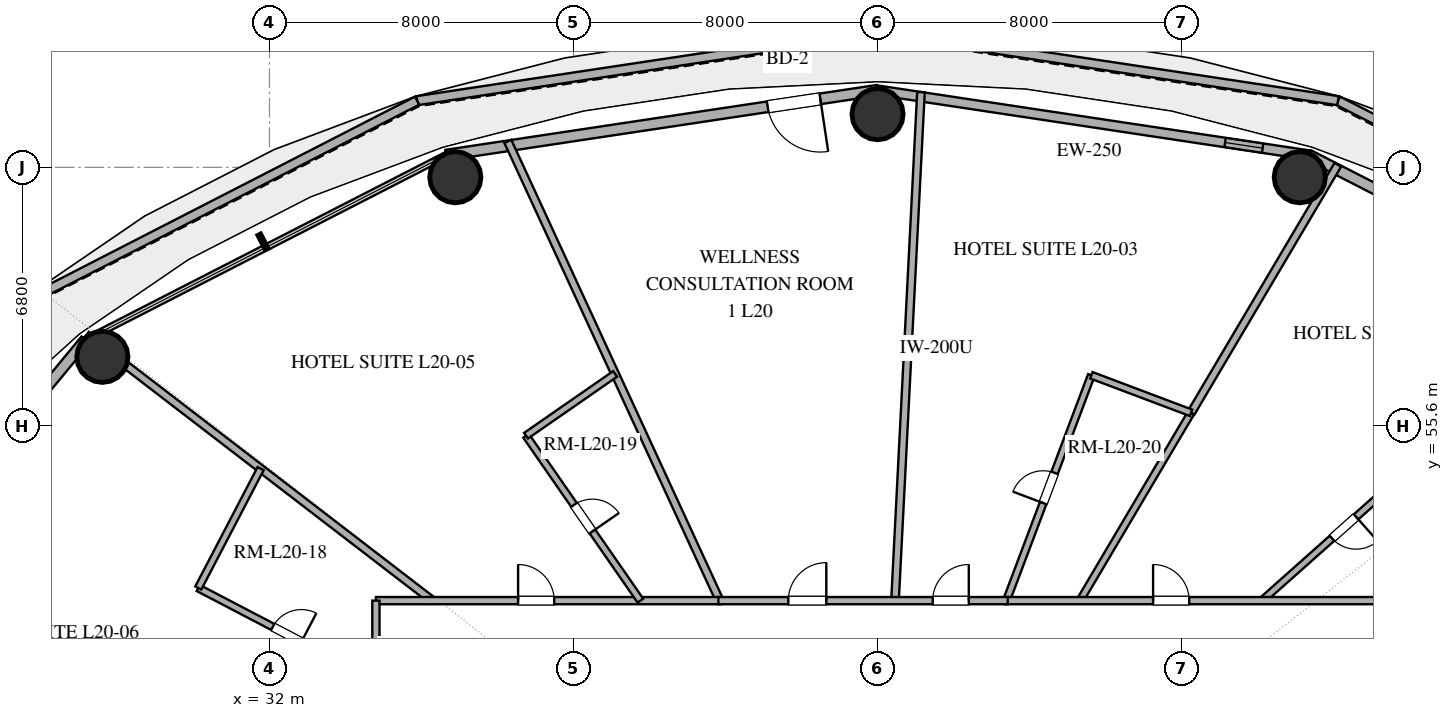
"""IFC4 building model, lengths in metres.
Left out: names, types, materials, properties, quantities, classifications, styles, units other than length and angle.
Written with IfcOpenShell. Run it as: python <this file> out.ifc"""

import sys

from ifc_helpers import new_model, si_unit, direction, frame, frame_2d, origin, origin_2d, place, context, subcontext, project, spatial, rectangle, hollow_circle, extrude, element, fill, save


model = new_model("IFC4")
c1 = context("Model", 3, precision=1e-05, world=origin(), true_north=direction((0.0, 1.0)))
c2 = subcontext(c1, "Body", "Model", "MODEL_VIEW")
j1 = project(units=[si_unit("LENGTHUNIT", "METRE"), si_unit("PLANEANGLEUNIT", "RADIAN")], contexts=[c1])
p1 = place(None, origin())
s1 = spatial("IfcSite", under=j1, at=p1, CompositionType="ELEMENT")
p2 = place(p1, origin())
s2 = spatial("IfcBuilding", under=s1, at=p2, CompositionType="ELEMENT")
p3 = place(p2, frame((0.0, 0.0, 84.0)))
s3 = spatial("IfcBuildingStorey", under=s2, at=p3, CompositionType="ELEMENT", Elevation=84.0)
for number, where, z_axis, x_axis in (
    (1, (59.11, 62.141, 0.0), (0.0, 0.0, 1.0), (1.0, 0.0, 0.0)),
    (2, (48.0, 63.8, 0.0), (0.0, 0.0, 1.0), (1.0, 0.0, 0.0)),
    (3, (36.89, 62.141, 0.0), (0.0, 0.0, 1.0), (1.0, 0.0, 0.0)),
    (4, (27.602, 57.415, 0.0), (0.0, 0.0, 1.0), (1.0, 0.0, 0.0)),
):
    element("IfcColumn", number, at=place(p3, frame(where, z_axis=z_axis, x_axis=x_axis)), inside=s3, PredefinedType="COLUMN", context=c2, shape_type="SweptSolid", body=[
        extrude(hollow_circle(Radius=0.675, WallThickness=0.036, at=origin_2d()), origin(), (0.0, 0.0, 1.0), 3.38),
    ])
p4 = place(p3, frame((70.244, 58.956, 0.0), z_axis=(0.0, 0.0, 1.0), x_axis=(-0.889663800129, 0.456616165658, 0.0)))
e5 = element("IfcWall", 5, at=p4, inside=s3, PredefinedType="PARAPET", context=c2, shape_type="SweptSolid", body=[
    extrude(rectangle(XDim=11.384, YDim=0.24, at=frame_2d((5.692, 0.0))), origin(), (0.0, 0.0, 1.0), 1.25),
])
for number, where, z_axis, x_axis in (
    (6, (60.116, 64.155, 0.0), (0.0, 0.0, 1.0), (-0.989, 0.149, 0.0)),
    (7, (48.0, 65.98, 0.0), (0.0, 0.0, 1.0), (-0.989, -0.149, 0.0)),
):
    element("IfcWall", number, at=place(p3, frame(where, z_axis=z_axis, x_axis=x_axis)), inside=s3, PredefinedType="PARAPET", context=c2, shape_type="SweptSolid", body=[
        extrude(rectangle(XDim=12.253, YDim=0.24, at=frame_2d((6.126, 0.0))), origin(), (0.0, 0.0, 1.0), 1.25),
    ])
p5 = place(p3, frame((35.884, 64.155, 0.0), z_axis=(0.0, 0.0, 1.0), x_axis=(-0.889663800129, -0.456616165658, 0.0)))
e8 = element("IfcWall", 8, at=p5, inside=s3, PredefinedType="PARAPET", context=c2, shape_type="SweptSolid", body=[
    extrude(rectangle(XDim=11.384, YDim=0.24, at=frame_2d((5.692, 0.0))), origin(), (0.0, 0.0, 1.0), 1.25),
])
p6 = place(p3, frame((68.84, 57.86, 0.0), z_axis=(0.0, 0.0, 1.0), x_axis=(-0.889959505023, 0.45603955905, 0.0)))
e9 = element("IfcWall", 9, at=p6, inside=s3, PredefinedType="SOLIDWALL", context=c2, shape_type="SweptSolid", body=[
    extrude(rectangle(XDim=10.662, YDim=0.28, at=frame_2d((5.331, 0.0))), origin(), (0.0, 0.0, 1.0), 3.38),
])
p7 = place(p6, frame((3.331, 0.0, 0.85)))
e10 = element("IfcOpeningElement", 10, at=p7, cuts=e9, PredefinedType="OPENING", context=c2, shape_type="SweptSolid", body=[
    extrude(rectangle(XDim=1.2, YDim=1.6, at=frame_2d((0.6, 0.8))), frame((0.0, 0.15, 0.0), z_axis=(0.0, -1.0, 0.0), x_axis=(1.0, 0.0, 0.0)), (0.0, 0.0, 1.0), 0.3),
])
p8 = place(p6, frame((6.271, 0.0, 0.85)))
e11 = element("IfcOpeningElement", 11, at=p8, cuts=e9, PredefinedType="OPENING", context=c2, shape_type="SweptSolid", body=[
    extrude(rectangle(XDim=1.2, YDim=1.6, at=frame_2d((0.6, 0.8))), frame((0.0, 0.15, 0.0), z_axis=(0.0, -1.0, 0.0), x_axis=(1.0, 0.0, 0.0)), (0.0, 0.0, 1.0), 0.3),
])
p9 = place(p3, frame((59.351, 62.723, 0.0), z_axis=(0.0, 0.0, 1.0), x_axis=(-0.988877774656, 0.148730450117, 0.0)))
e12 = element("IfcWall", 12, at=p9, inside=s3, PredefinedType="SOLIDWALL", context=c2, shape_type="SweptSolid", body=[
    extrude(rectangle(XDim=11.479, YDim=0.25, at=frame_2d((5.74, 0.0))), origin(), (0.0, 0.0, 1.0), 3.38),
])
p10 = place(p9, frame((1.231, 0.0, 1.42)))
e13 = element("IfcOpeningElement", 13, at=p10, cuts=e12, PredefinedType="OPENING", context=c2, shape_type="SweptSolid", body=[
    extrude(rectangle(XDim=1.0, YDim=1.05, at=frame_2d((0.5, 0.525))), frame((0.0, 0.135, 0.0), z_axis=(0.0, -1.0, 0.0), x_axis=(1.0, 0.0, 0.0)), (0.0, 0.0, 1.0), 0.27),
])
p11 = place(p3, frame((48.0, 64.43, 0.0), z_axis=(0.0, 0.0, 1.0), x_axis=(-0.988877774656, -0.148730450117, 0.0)))
e14 = element("IfcWall", 14, at=p11, inside=s3, PredefinedType="SOLIDWALL", context=c2, shape_type="SweptSolid", body=[
    extrude(rectangle(XDim=11.479, YDim=0.28, at=frame_2d((5.74, 0.0))), origin(), (0.0, 0.0, 1.0), 3.38),
])
p12 = place(p11, frame((1.524, 0.0, 0.0)))
e15 = element("IfcOpeningElement", 15, at=p12, cuts=e14, PredefinedType="OPENING", context=c2, shape_type="SweptSolid", body=[
    extrude(rectangle(XDim=1.4, YDim=2.2, at=frame_2d((0.7, 1.1))), frame((0.0, 0.15, 0.0), z_axis=(0.0, -1.0, 0.0), x_axis=(1.0, 0.0, 0.0)), (0.0, 0.0, 1.0), 0.3),
])
p13 = place(p3, frame((27.16, 57.86, 0.0), z_axis=(0.0, 0.0, 1.0), x_axis=(-0.637505817448, -0.770445541696, 0.0)))
e16 = element("IfcWall", 16, at=p13, inside=s3, PredefinedType="SOLIDWALL", context=c2, shape_type="SweptSolid", body=[
    extrude(rectangle(XDim=9.445, YDim=0.28, at=frame_2d((4.723, 0.0))), origin(), (0.0, 0.0, 1.0), 3.38),
])
p14 = place(p13, frame((2.597, 0.0, 0.85)))
e17 = element("IfcOpeningElement", 17, at=p14, cuts=e16, PredefinedType="OPENING", context=c2, shape_type="SweptSolid", body=[
    extrude(rectangle(XDim=1.5, YDim=2.0, at=frame_2d((0.75, 1.0))), frame((0.0, 0.15, 0.0), z_axis=(0.0, -1.0, 0.0), x_axis=(1.0, 0.0, 0.0)), (0.0, 0.0, 1.0), 0.3),
])
p15 = place(p13, frame((5.232, 0.0, 0.85)))
e18 = element("IfcOpeningElement", 18, at=p15, cuts=e16, PredefinedType="OPENING", context=c2, shape_type="SweptSolid", body=[
    extrude(rectangle(XDim=1.5, YDim=2.0, at=frame_2d((0.75, 1.0))), frame((0.0, 0.15, 0.0), z_axis=(0.0, -1.0, 0.0), x_axis=(1.0, 0.0, 0.0)), (0.0, 0.0, 1.0), 0.3),
])
p16 = place(p3, frame((49.143, 64.379, 0.0), z_axis=(0.0, 0.0, 1.0), x_axis=(-0.050973793346, -0.998699991185, 0.0)))
e19 = element("IfcWall", 19, at=p16, inside=s3, PredefinedType="PARTITIONING", context=c2, shape_type="SweptSolid", body=[
    extrude(rectangle(XDim=13.396, YDim=0.2, at=frame_2d((6.698, 0.0))), origin(), (0.0, 0.0, 1.0), 2.74),
])
p17 = place(p3, frame((60.112, 62.468, 0.0), z_axis=(0.0, 0.0, 1.0), x_axis=(-0.509263960295, -0.860610375689, 0.0)))
e20 = element("IfcWall", 20, at=p17, inside=s3, PredefinedType="PARTITIONING", context=c2, shape_type="SweptSolid", body=[
    extrude(rectangle(XDim=7.583, YDim=0.2, at=frame_2d((3.792, 0.0))), origin(), (0.0, 0.0, 1.0), 2.74),
])
p18 = place(p3, frame((43.847, 51.0, 0.0), z_axis=(0.0, 0.0, 1.0), x_axis=(-0.418953467184, 0.908007704997, 0.0)))
e21 = element("IfcWall", 21, at=p18, inside=s3, PredefinedType="PARTITIONING", context=c2, shape_type="SweptSolid", body=[
    extrude(rectangle(XDim=13.307, YDim=0.2, at=frame_2d((6.654, 0.0))), origin(), (0.0, 0.0, 1.0), 2.74),
])
p19 = place(p3, frame((51.391, 51.0, 0.0), z_axis=(0.0, 0.0, 1.0), x_axis=(0.352583810303, 0.935780239539, 0.0)))
e22 = element("IfcWall", 22, at=p19, inside=s3, PredefinedType="PLUMBINGWALL", context=c2, shape_type="SweptSolid", body=[
    extrude(rectangle(XDim=6.337, YDim=0.18, at=frame_2d((3.168, 0.0))), origin(), (0.0, 0.0, 1.0), 2.74),
])
p20 = place(p19, frame((2.744, 0.0, 0.0)))
e23 = element("IfcOpeningElement", 23, at=p20, cuts=e22, PredefinedType="OPENING", context=c2, shape_type="SweptSolid", body=[
    extrude(rectangle(XDim=0.85, YDim=2.1, at=frame_2d((0.425, 1.05))), frame((0.0, 0.1, 0.0), z_axis=(0.0, -1.0, 0.0), x_axis=(1.0, 0.0, 0.0)), (0.0, 0.0, 1.0), 0.2),
])
p21 = place(p3, frame((36.287, 51.0, 0.0), z_axis=(0.0, 0.0, 1.0), x_axis=(-0.792955910196, 0.609279020224, 0.0)))
e24 = element("IfcWall", 24, at=p21, inside=s3, PredefinedType="PARTITIONING", context=c2, shape_type="SweptSolid", body=[
    extrude(rectangle(XDim=11.48, YDim=0.2, at=frame_2d((5.74, 0.0))), origin(), (0.0, 0.0, 1.0), 2.74),
])
p22 = place(p3, frame((62.436, 54.844, 0.0), z_axis=(0.0, 0.0, 1.0), x_axis=(-0.747085499985, -0.664727956168, 0.0)))
e25 = element("IfcWall", 25, at=p22, inside=s3, PredefinedType="PLUMBINGWALL", context=c2, shape_type="SweptSolid", body=[
    extrude(rectangle(XDim=5.783, YDim=0.18, at=frame_2d((2.892, 0.0))), origin(), (0.0, 0.0, 1.0), 2.74),
])
p23 = place(p22, frame((2.467, 0.0, 0.0)))
e26 = element("IfcOpeningElement", 26, at=p23, cuts=e25, PredefinedType="OPENING", context=c2, shape_type="SweptSolid", body=[
    extrude(rectangle(XDim=0.85, YDim=2.1, at=frame_2d((0.425, 1.05))), frame((0.0, 0.1, 0.0), z_axis=(0.0, -1.0, 0.0), x_axis=(1.0, 0.0, 0.0)), (0.0, 0.0, 1.0), 0.2),
])
p24 = place(p3, frame((56.25, 55.941, 0.0), z_axis=(0.0, 0.0, 1.0), x_axis=(-0.509296473297, -0.860591135376, 0.0)))
e27 = element("IfcWall", 27, at=p24, inside=s3, PredefinedType="PLUMBINGWALL", context=c2, shape_type="SweptSolid", body=[
    extrude(rectangle(XDim=5.742, YDim=0.18, at=frame_2d((2.871, 0.0))), origin(), (0.0, 0.0, 1.0), 2.74),
])
p25 = place(p3, frame((34.8, 51.0, 0.0), z_axis=(0.0, 0.0, 1.0), x_axis=(1.0, 0.0, 0.0)))
e28 = element("IfcWall", 28, at=p25, inside=s3, PredefinedType="PARTITIONING", context=c2, shape_type="SweptSolid", body=[
    extrude(rectangle(XDim=9.083, YDim=0.19, at=frame_2d((4.541, 0.0))), origin(), (0.0, 0.0, 1.0), 2.74),
])
p26 = place(p25, frame((3.741, 0.0, 0.0)))
e29 = element("IfcOpeningElement", 29, at=p26, cuts=e28, PredefinedType="OPENING", context=c2, shape_type="SweptSolid", body=[
    extrude(rectangle(XDim=0.95, YDim=2.15, at=frame_2d((0.475, 1.075))), frame((0.0, 0.105, 0.0), z_axis=(0.0, -1.0, 0.0), x_axis=(1.0, 0.0, 0.0)), (0.0, 0.0, 1.0), 0.21),
])
p27 = place(p3, frame((38.75, 55.34, 0.0), z_axis=(0.0, 0.0, 1.0), x_axis=(0.569842064311, -0.821754234393, 0.0)))
e30 = element("IfcWall", 30, at=p27, inside=s3, PredefinedType="PLUMBINGWALL", context=c2, shape_type="SweptSolid", body=[
    extrude(rectangle(XDim=5.281, YDim=0.18, at=frame_2d((2.641, 0.0))), origin(), (0.0, 0.0, 1.0), 2.74),
])
p28 = place(p27, frame((2.215, 0.0, 0.0)))
e31 = element("IfcOpeningElement", 31, at=p28, cuts=e30, PredefinedType="OPENING", context=c2, shape_type="SweptSolid", body=[
    extrude(rectangle(XDim=0.85, YDim=2.1, at=frame_2d((0.425, 1.05))), frame((0.0, 0.1, 0.0), z_axis=(0.0, -1.0, 0.0), x_axis=(1.0, 0.0, 0.0)), (0.0, 0.0, 1.0), 0.2),
])
p29 = place(p3, frame((30.126, 51.332, 0.0), z_axis=(0.0, 0.0, 1.0), x_axis=(0.886465103711, -0.462795440668, 0.0)))
e32 = element("IfcWall", 32, at=p29, inside=s3, PredefinedType="PLUMBINGWALL", context=c2, shape_type="SweptSolid", body=[
    extrude(rectangle(XDim=5.273, YDim=0.18, at=frame_2d((2.636, 0.0))), origin(), (0.0, 0.0, 1.0), 2.74),
])
p30 = place(p29, frame((2.211, 0.0, 0.0)))
e33 = element("IfcOpeningElement", 33, at=p30, cuts=e32, PredefinedType="OPENING", context=c2, shape_type="SweptSolid", body=[
    extrude(rectangle(XDim=0.85, YDim=2.1, at=frame_2d((0.425, 1.05))), frame((0.0, 0.1, 0.0), z_axis=(0.0, -1.0, 0.0), x_axis=(1.0, 0.0, 0.0)), (0.0, 0.0, 1.0), 0.2),
])
p31 = place(p3, frame((51.357, 51.0, 0.0), z_axis=(0.0, 0.0, 1.0), x_axis=(1.0, 0.0, 0.0)))
e34 = element("IfcWall", 34, at=p31, inside=s3, PredefinedType="PARTITIONING", context=c2, shape_type="SweptSolid", body=[
    extrude(rectangle(XDim=9.843, YDim=0.19, at=frame_2d((4.921, 0.0))), origin(), (0.0, 0.0, 1.0), 2.74),
])
p32 = place(p31, frame((3.894, 0.0, 0.0)))
e35 = element("IfcOpeningElement", 35, at=p32, cuts=e34, PredefinedType="OPENING", context=c2, shape_type="SweptSolid", body=[
    extrude(rectangle(XDim=0.95, YDim=2.15, at=frame_2d((0.475, 1.075))), frame((0.0, 0.105, 0.0), z_axis=(0.0, -1.0, 0.0), x_axis=(1.0, 0.0, 0.0)), (0.0, 0.0, 1.0), 0.21),
])
p33 = place(p3, frame((43.812, 51.0, 0.0), z_axis=(0.0, 0.0, 1.0), x_axis=(1.0, 0.0, 0.0)))
e36 = element("IfcWall", 36, at=p33, inside=s3, PredefinedType="PARTITIONING", context=c2, shape_type="SweptSolid", body=[
    extrude(rectangle(XDim=7.613, YDim=0.19, at=frame_2d((3.807, 0.0))), origin(), (0.0, 0.0, 1.0), 2.74),
])
p34 = place(p33, frame((1.84, 0.0, 0.0)))
e37 = element("IfcOpeningElement", 37, at=p34, cuts=e36, PredefinedType="OPENING", context=c2, shape_type="SweptSolid", body=[
    extrude(rectangle(XDim=1.0, YDim=2.2, at=frame_2d((0.5, 1.1))), frame((0.0, 0.105, 0.0), z_axis=(0.0, -1.0, 0.0), x_axis=(1.0, 0.0, 0.0)), (0.0, 0.0, 1.0), 0.21),
])
p35 = place(p33, frame((5.639, 0.0, 0.0)))
e38 = element("IfcOpeningElement", 38, at=p35, cuts=e36, PredefinedType="OPENING", context=c2, shape_type="SweptSolid", body=[
    extrude(rectangle(XDim=0.95, YDim=2.15, at=frame_2d((0.475, 1.075))), frame((0.0, 0.105, 0.0), z_axis=(0.0, -1.0, 0.0), x_axis=(1.0, 0.0, 0.0)), (0.0, 0.0, 1.0), 0.21),
])
p36 = place(p3, frame((34.8, 41.94, 0.0), z_axis=(0.0, 0.0, 1.0), x_axis=(0.0, 1.0, 0.0)))
e39 = element("IfcWall", 39, at=p36, inside=s3, PredefinedType="PARTITIONING", context=c2, shape_type="SweptSolid", body=[
    extrude(rectangle(XDim=9.06, YDim=0.19, at=frame_2d((4.53, 0.0))), origin(), (0.0, 0.0, 1.0), 2.74),
])
p37 = place(p36, frame((4.179, 0.0, 0.0)))
e40 = element("IfcOpeningElement", 40, at=p37, cuts=e39, PredefinedType="OPENING", context=c2, shape_type="SweptSolid", body=[
    extrude(rectangle(XDim=0.95, YDim=2.15, at=frame_2d((0.475, 1.075))), frame((0.0, 0.105, 0.0), z_axis=(0.0, -1.0, 0.0), x_axis=(1.0, 0.0, 0.0)), (0.0, 0.0, 1.0), 0.21),
])
p38 = place(p3, frame((31.766, 54.474, 0.0), z_axis=(0.0, 0.0, 1.0), x_axis=(-0.462822582901, -0.886450933079, 0.0)))
e41 = element("IfcWall", 41, at=p38, inside=s3, PredefinedType="PLUMBINGWALL", context=c2, shape_type="SweptSolid", body=[
    extrude(rectangle(XDim=3.544, YDim=0.18, at=frame_2d((1.772, 0.0))), origin(), (0.0, 0.0, 1.0), 2.74),
])
p39 = place(p3, frame((41.095, 56.965, 0.0), z_axis=(0.0, 0.0, 1.0), x_axis=(-0.821788449593, -0.569792720308, 0.0)))
e42 = element("IfcWall", 42, at=p39, inside=s3, PredefinedType="PLUMBINGWALL", context=c2, shape_type="SweptSolid", body=[
    extrude(rectangle(XDim=2.853, YDim=0.18, at=frame_2d((1.427, 0.0))), origin(), (0.0, 0.0, 1.0), 2.74),
])
p40 = place(p3, frame((53.625, 56.93, 0.0), z_axis=(0.0, 0.0, 1.0), x_axis=(0.93579147225, -0.352553996522, 0.0)))
e43 = element("IfcWall", 43, at=p40, inside=s3, PredefinedType="PLUMBINGWALL", context=c2, shape_type="SweptSolid", body=[
    extrude(rectangle(XDim=2.805, YDim=0.18, at=frame_2d((1.402, 0.0))), origin(), (0.0, 0.0, 1.0), 2.74),
])
p41 = place(p12, origin())
e44 = element("IfcDoor", 44, at=p41, inside=s3, OperationType="SINGLE_SWING_LEFT", PredefinedType="DOOR", context=c2, shape_type="SweptSolid", body=[
    extrude(rectangle(XDim=1.4, YDim=2.2, at=frame_2d((0.7, 1.1))), frame((0.0, 0.025, 0.0), z_axis=(0.0, -1.0, 0.0), x_axis=(1.0, 0.0, 0.0)), (0.0, 0.0, 1.0), 0.05),
])
fill(e15, e44)
p42 = place(p10, origin())
e45 = element("IfcWindow", 45, at=p42, inside=s3, PartitioningType="SINGLE_PANEL", PredefinedType="WINDOW", context=c2, shape_type="SweptSolid", body=[
    extrude(rectangle(XDim=1.0, YDim=1.05, at=frame_2d((0.5, 0.525))), frame((0.0, 0.03, 0.0), z_axis=(0.0, -1.0, 0.0), x_axis=(1.0, 0.0, 0.0)), (0.0, 0.0, 1.0), 0.06),
])
fill(e13, e45)
p43 = place(p20, origin())
e46 = element("IfcDoor", 46, at=p43, inside=s3, OperationType="SINGLE_SWING_LEFT", PredefinedType="DOOR", context=c2, shape_type="SweptSolid", body=[
    extrude(rectangle(XDim=0.85, YDim=2.1, at=frame_2d((0.425, 1.05))), frame((0.0, 0.025, 0.0), z_axis=(0.0, -1.0, 0.0), x_axis=(1.0, 0.0, 0.0)), (0.0, 0.0, 1.0), 0.05),
])
fill(e23, e46)
p44 = place(p23, origin())
e47 = element("IfcDoor", 47, at=p44, inside=s3, OperationType="SINGLE_SWING_LEFT", PredefinedType="DOOR", context=c2, shape_type="SweptSolid", body=[
    extrude(rectangle(XDim=0.85, YDim=2.1, at=frame_2d((0.425, 1.05))), frame((0.0, 0.025, 0.0), z_axis=(0.0, -1.0, 0.0), x_axis=(1.0, 0.0, 0.0)), (0.0, 0.0, 1.0), 0.05),
])
fill(e26, e47)
p45 = place(p26, origin())
e48 = element("IfcDoor", 48, at=p45, inside=s3, OperationType="SINGLE_SWING_LEFT", PredefinedType="DOOR", context=c2, shape_type="SweptSolid", body=[
    extrude(rectangle(XDim=0.95, YDim=2.15, at=frame_2d((0.475, 1.075))), frame((0.0, 0.025, 0.0), z_axis=(0.0, -1.0, 0.0), x_axis=(1.0, 0.0, 0.0)), (0.0, 0.0, 1.0), 0.05),
])
fill(e29, e48)
p46 = place(p28, origin())
e49 = element("IfcDoor", 49, at=p46, inside=s3, OperationType="SINGLE_SWING_RIGHT", PredefinedType="DOOR", context=c2, shape_type="SweptSolid", body=[
    extrude(rectangle(XDim=0.85, YDim=2.1, at=frame_2d((0.425, 1.05))), frame((0.0, 0.025, 0.0), z_axis=(0.0, -1.0, 0.0), x_axis=(1.0, 0.0, 0.0)), (0.0, 0.0, 1.0), 0.05),
])
fill(e31, e49)
p47 = place(p30, origin())
e50 = element("IfcDoor", 50, at=p47, inside=s3, OperationType="SINGLE_SWING_RIGHT", PredefinedType="DOOR", context=c2, shape_type="SweptSolid", body=[
    extrude(rectangle(XDim=0.85, YDim=2.1, at=frame_2d((0.425, 1.05))), frame((0.0, 0.025, 0.0), z_axis=(0.0, -1.0, 0.0), x_axis=(1.0, 0.0, 0.0)), (0.0, 0.0, 1.0), 0.05),
])
fill(e33, e50)
p48 = place(p32, origin())
e51 = element("IfcDoor", 51, at=p48, inside=s3, OperationType="SINGLE_SWING_LEFT", PredefinedType="DOOR", context=c2, shape_type="SweptSolid", body=[
    extrude(rectangle(XDim=0.95, YDim=2.15, at=frame_2d((0.475, 1.075))), frame((0.0, 0.025, 0.0), z_axis=(0.0, -1.0, 0.0), x_axis=(1.0, 0.0, 0.0)), (0.0, 0.0, 1.0), 0.05),
])
fill(e35, e51)
p49 = place(p34, origin())
e52 = element("IfcDoor", 52, at=p49, inside=s3, OperationType="SINGLE_SWING_RIGHT", PredefinedType="DOOR", context=c2, shape_type="SweptSolid", body=[
    extrude(rectangle(XDim=1.0, YDim=2.2, at=frame_2d((0.5, 1.1))), frame((0.0, 0.025, 0.0), z_axis=(0.0, -1.0, 0.0), x_axis=(1.0, 0.0, 0.0)), (0.0, 0.0, 1.0), 0.05),
])
fill(e37, e52)
p50 = place(p35, origin())
e53 = element("IfcDoor", 53, at=p50, inside=s3, OperationType="SINGLE_SWING_RIGHT", PredefinedType="DOOR", context=c2, shape_type="SweptSolid", body=[
    extrude(rectangle(XDim=0.95, YDim=2.15, at=frame_2d((0.475, 1.075))), frame((0.0, 0.025, 0.0), z_axis=(0.0, -1.0, 0.0), x_axis=(1.0, 0.0, 0.0)), (0.0, 0.0, 1.0), 0.05),
])
fill(e38, e53)
save(model, sys.argv[1])
